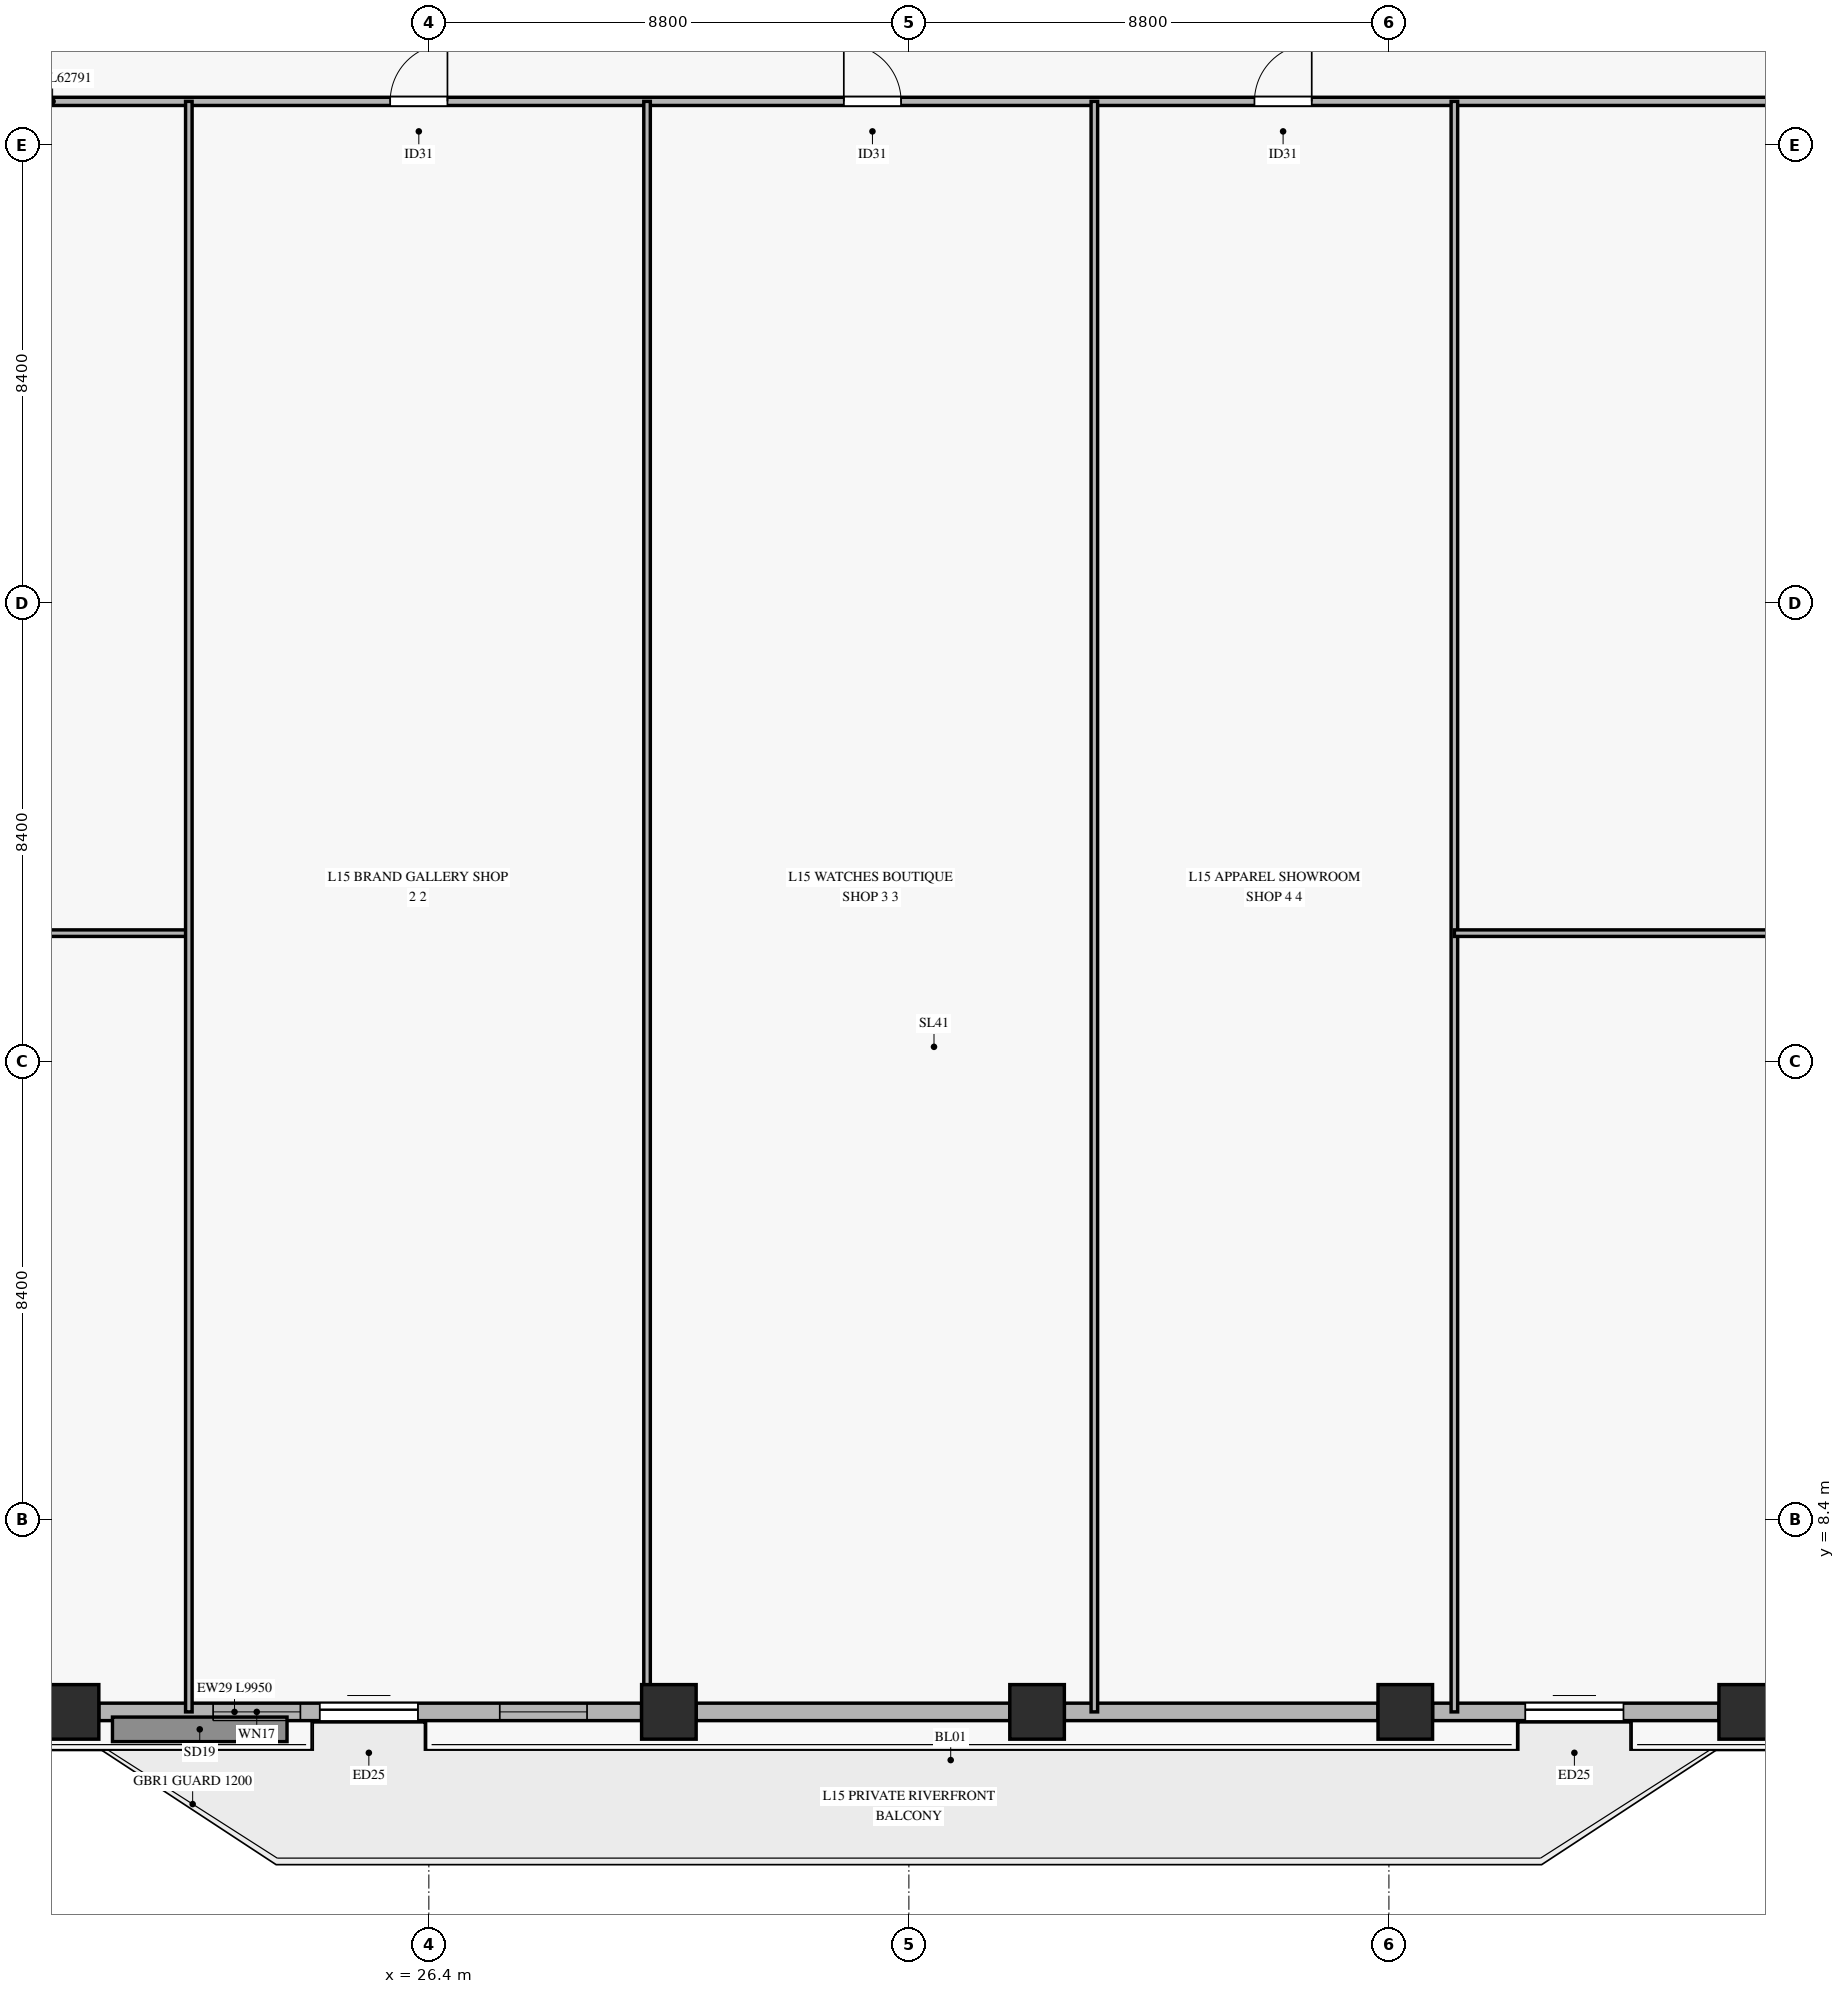
"""IFC4 building model, lengths in metres.
Left out: names, types, materials, properties, quantities, classifications, styles, units other than length and angle.
Written with IfcOpenShell. Run it as: python <this file> out.ifc"""

import sys

from ifc_helpers import new_model, si_unit, direction, frame, frame_2d, origin, origin_2d, place, context, subcontext, project, spatial, rectangle, hollow_rectangle, extrude, source, transform, mapped, element, fill, save


model = new_model("IFC4")
c1 = context("Model", 3, precision=1e-05, world=origin(), true_north=direction((0.0, 1.0)))
c2 = subcontext(c1, "Body", "Model", "MODEL_VIEW")
j1 = project(units=[si_unit("LENGTHUNIT", "METRE"), si_unit("PLANEANGLEUNIT", "RADIAN")], contexts=[c1])
p1 = place(None, origin())
s1 = spatial("IfcSite", under=j1, at=p1, CompositionType="ELEMENT")
p2 = place(p1, origin())
s2 = spatial("IfcBuilding", under=s1, at=p2, CompositionType="ELEMENT")
p3 = place(p2, frame((0.0, 0.0, 61.1)))
s3 = spatial("IfcBuildingStorey", under=s2, at=p3, CompositionType="ELEMENT", Elevation=61.1)
m1 = source(origin(), c2, "Body", "SweptSolid", [
    extrude(hollow_rectangle(XDim=1.0, YDim=1.0, WallThickness=0.045, at=origin_2d()), origin(), (0.0, 0.0, 1.0), 3.68),
])
for number, where, z_axis, x_axis in (
    (1, (19.85, 4.882, 0.0), (0.0, 0.0, 1.0), (1.0, 0.0, 0.0)),
    (2, (30.8, 4.882, 0.0), (0.0, 0.0, 1.0), (1.0, 0.0, 0.0)),
    (3, (37.55, 4.882, 0.0), (0.0, 0.0, 1.0), (1.0, 0.0, 0.0)),
    (4, (44.3, 4.882, 0.0), (0.0, 0.0, 1.0), (1.0, 0.0, 0.0)),
    (5, (50.55, 4.882, 0.0), (0.0, 0.0, 1.0), (1.0, 0.0, 0.0)),
):
    element("IfcColumn", number, at=place(p3, frame(where, z_axis=z_axis, x_axis=x_axis)), inside=s3, PredefinedType="COLUMN", context=c2, shape_type="MappedRepresentation", body=[
        mapped(m1, transform((0.0, 0.0, 0.0), x_axis=(1.0, 0.0, 0.0), y_axis=(0.0, 1.0, 0.0), z_axis=(0.0, 0.0, 1.0), scale=1.0)),
    ])
p4 = place(p3, frame((20.35, 4.882, 0.0), z_axis=(0.0, 0.0, 1.0), x_axis=(1.0, 0.0, 0.0)))
e6 = element("IfcWall", 6, at=p4, inside=s3, PredefinedType="SOLIDWALL", context=c2, shape_type="SweptSolid", body=[
    extrude(rectangle(XDim=9.95, YDim=0.32, at=frame_2d((4.975, 0.0))), origin(), (0.0, 0.0, 1.0), 3.16),
])
p5 = place(p4, frame((4.05, 0.0, 0.0)))
e7 = element("IfcOpeningElement", 7, at=p5, cuts=e6, PredefinedType="OPENING", context=c2, shape_type="SweptSolid", body=[
    extrude(rectangle(XDim=1.8, YDim=2.25, at=frame_2d((0.9, 1.125))), frame((0.0, 0.17, 0.0), z_axis=(0.0, -1.0, 0.0), x_axis=(1.0, 0.0, 0.0)), (0.0, 0.0, 1.0), 0.34),
])
p6 = place(p4, frame((2.095, 0.0, 0.45)))
e8 = element("IfcOpeningElement", 8, at=p6, cuts=e6, PredefinedType="OPENING", context=c2, shape_type="SweptSolid", body=[
    extrude(rectangle(XDim=1.6, YDim=2.0, at=frame_2d((0.8, 1.0))), frame((0.0, 0.17, 0.0), z_axis=(0.0, -1.0, 0.0), x_axis=(1.0, 0.0, 0.0)), (0.0, 0.0, 1.0), 0.34),
])
p7 = place(p4, frame((7.35, 0.0, 0.45)))
e9 = element("IfcOpeningElement", 9, at=p7, cuts=e6, PredefinedType="OPENING", context=c2, shape_type="SweptSolid", body=[
    extrude(rectangle(XDim=1.6, YDim=2.0, at=frame_2d((0.8, 1.0))), frame((0.0, 0.17, 0.0), z_axis=(0.0, -1.0, 0.0), x_axis=(1.0, 0.0, 0.0)), (0.0, 0.0, 1.0), 0.34),
])
for number, where, z_axis, x_axis in (
    (10, (31.3, 4.882, 0.0), (0.0, 0.0, 1.0), (1.0, 0.0, 0.0)),
    (11, (38.05, 4.882, 0.0), (0.0, 0.0, 1.0), (1.0, 0.0, 0.0)),
):
    element("IfcWall", number, at=place(p3, frame(where, z_axis=z_axis, x_axis=x_axis)), inside=s3, PredefinedType="SOLIDWALL", context=c2, shape_type="SweptSolid", body=[
        extrude(rectangle(XDim=5.75, YDim=0.32, at=frame_2d((2.875, 0.0))), origin(), (0.0, 0.0, 1.0), 3.16),
    ])
p8 = place(p3, frame((44.8, 4.882, 0.0), z_axis=(0.0, 0.0, 1.0), x_axis=(1.0, 0.0, 0.0)))
e12 = element("IfcWall", 12, at=p8, inside=s3, PredefinedType="SOLIDWALL", context=c2, shape_type="SweptSolid", body=[
    extrude(rectangle(XDim=5.25, YDim=0.32, at=frame_2d((2.625, 0.0))), origin(), (0.0, 0.0, 1.0), 3.16),
])
p9 = place(p8, frame((1.7, 0.0, 0.0)))
e13 = element("IfcOpeningElement", 13, at=p9, cuts=e12, PredefinedType="OPENING", context=c2, shape_type="SweptSolid", body=[
    extrude(rectangle(XDim=1.8, YDim=2.25, at=frame_2d((0.9, 1.125))), frame((0.0, 0.17, 0.0), z_axis=(0.0, -1.0, 0.0), x_axis=(1.0, 0.0, 0.0)), (0.0, 0.0, 1.0), 0.34),
])
p10 = place(p3, frame((3.805, 34.4, 0.0), z_axis=(0.0, 0.0, 1.0), x_axis=(1.0, 0.0, 0.0)))
e14 = element("IfcWall", 14, at=p10, inside=s3, PredefinedType="PARTITIONING", context=c2, shape_type="SweptSolid", body=[
    extrude(rectangle(XDim=62.791, YDim=0.15, at=frame_2d((31.396, 0.0))), origin(), (0.0, 0.0, 1.0), 2.765),
])
p11 = place(p10, frame((7.564, 0.0, 0.0)))
e15 = element("IfcOpeningElement", 15, at=p11, cuts=e14, PredefinedType="OPENING", context=c2, shape_type="SweptSolid", body=[
    extrude(rectangle(XDim=1.05, YDim=2.15, at=frame_2d((0.525, 1.075))), frame((0.0, 0.085, 0.0), z_axis=(0.0, -1.0, 0.0), x_axis=(1.0, 0.0, 0.0)), (0.0, 0.0, 1.0), 0.17),
])
p12 = place(p10, frame((21.886, 0.0, 0.0)))
e16 = element("IfcOpeningElement", 16, at=p12, cuts=e14, PredefinedType="OPENING", context=c2, shape_type="SweptSolid", body=[
    extrude(rectangle(XDim=1.05, YDim=2.15, at=frame_2d((0.525, 1.075))), frame((0.0, 0.085, 0.0), z_axis=(0.0, -1.0, 0.0), x_axis=(1.0, 0.0, 0.0)), (0.0, 0.0, 1.0), 0.17),
])
p13 = place(p10, frame((30.202, 0.0, 0.0)))
e17 = element("IfcOpeningElement", 17, at=p13, cuts=e14, PredefinedType="OPENING", context=c2, shape_type="SweptSolid", body=[
    extrude(rectangle(XDim=1.05, YDim=2.15, at=frame_2d((0.525, 1.075))), frame((0.0, 0.085, 0.0), z_axis=(0.0, -1.0, 0.0), x_axis=(1.0, 0.0, 0.0)), (0.0, 0.0, 1.0), 0.17),
])
p14 = place(p10, frame((37.73, 0.0, 0.0)))
e18 = element("IfcOpeningElement", 18, at=p14, cuts=e14, PredefinedType="OPENING", context=c2, shape_type="SweptSolid", body=[
    extrude(rectangle(XDim=1.05, YDim=2.15, at=frame_2d((0.525, 1.075))), frame((0.0, 0.085, 0.0), z_axis=(0.0, -1.0, 0.0), x_axis=(1.0, 0.0, 0.0)), (0.0, 0.0, 1.0), 0.17),
])
p15 = place(p10, frame((50.039, 0.0, 0.0)))
e19 = element("IfcOpeningElement", 19, at=p15, cuts=e14, PredefinedType="OPENING", context=c2, shape_type="SweptSolid", body=[
    extrude(rectangle(XDim=1.05, YDim=2.15, at=frame_2d((0.525, 1.075))), frame((0.0, 0.085, 0.0), z_axis=(0.0, -1.0, 0.0), x_axis=(1.0, 0.0, 0.0)), (0.0, 0.0, 1.0), 0.17),
])
p16 = place(p3, frame((3.805, 19.155, 0.0), z_axis=(0.0, 0.0, 1.0), x_axis=(1.0, 0.0, 0.0)))
e20 = element("IfcWall", 20, at=p16, inside=s3, PredefinedType="PARTITIONING", context=c2, shape_type="SweptSolid", body=[
    extrude(rectangle(XDim=18.195, YDim=0.12, at=frame_2d((9.098, 0.0))), origin(), (0.0, 0.0, 1.0), 2.765),
])
p17 = place(p16, frame((7.921, 0.0, 0.0)))
e21 = element("IfcOpeningElement", 21, at=p17, cuts=e20, PredefinedType="OPENING", context=c2, shape_type="SweptSolid", body=[
    extrude(rectangle(XDim=0.95, YDim=2.1, at=frame_2d((0.475, 1.05))), frame((0.0, 0.07, 0.0), z_axis=(0.0, -1.0, 0.0), x_axis=(1.0, 0.0, 0.0)), (0.0, 0.0, 1.0), 0.14),
])
p18 = place(p3, frame((22.0, 4.882, 0.0), z_axis=(0.0, 0.0, 1.0), x_axis=(0.0, 1.0, 0.0)))
e22 = element("IfcWall", 22, at=p18, inside=s3, PredefinedType="PARTITIONING", context=c2, shape_type="SweptSolid", body=[
    extrude(rectangle(XDim=29.518, YDim=0.12, at=frame_2d((14.759, 0.0))), origin(), (0.0, 0.0, 1.0), 3.165),
])
p19 = place(p3, frame((30.4, 4.882, 0.0), z_axis=(0.0, 0.0, 1.0), x_axis=(0.0, 1.0, 0.0)))
e23 = element("IfcWall", 23, at=p19, inside=s3, PredefinedType="PARTITIONING", context=c2, shape_type="SweptSolid", body=[
    extrude(rectangle(XDim=29.518, YDim=0.12, at=frame_2d((14.759, 0.0))), origin(), (0.0, 0.0, 1.0), 3.215),
])
for number, where, z_axis, x_axis in (
    (24, (38.6, 4.882, 0.0), (0.0, 0.0, 1.0), (0.0, 1.0, 0.0)),
    (25, (45.2, 4.882, 0.0), (0.0, 0.0, 1.0), (0.0, 1.0, 0.0)),
):
    element("IfcWall", number, at=place(p3, frame(where, z_axis=z_axis, x_axis=x_axis)), inside=s3, PredefinedType="PARTITIONING", context=c2, shape_type="SweptSolid", body=[
        extrude(rectangle(XDim=29.518, YDim=0.12, at=frame_2d((14.759, 0.0))), origin(), (0.0, 0.0, 1.0), 3.165),
    ])
p20 = place(p3, frame((45.2, 19.155, 0.0), z_axis=(0.0, 0.0, 1.0), x_axis=(1.0, 0.0, 0.0)))
e26 = element("IfcWall", 26, at=p20, inside=s3, PredefinedType="PARTITIONING", context=c2, shape_type="SweptSolid", body=[
    extrude(rectangle(XDim=21.396, YDim=0.12, at=frame_2d((10.698, 0.0))), origin(), (0.0, 0.0, 1.0), 2.765),
])
p21 = place(p20, frame((9.065, 0.0, 0.0)))
e27 = element("IfcOpeningElement", 27, at=p21, cuts=e26, PredefinedType="OPENING", context=c2, shape_type="SweptSolid", body=[
    extrude(rectangle(XDim=0.95, YDim=2.1, at=frame_2d((0.475, 1.05))), frame((0.0, 0.07, 0.0), z_axis=(0.0, -1.0, 0.0), x_axis=(1.0, 0.0, 0.0)), (0.0, 0.0, 1.0), 0.14),
])
m2 = source(origin(), c2, "Body", "SweptSolid", [
    extrude(rectangle(XDim=1.8, YDim=2.25, at=frame_2d((0.9, 1.125))), frame((0.0, 0.025, 0.0), z_axis=(0.0, -1.0, 0.0), x_axis=(1.0, 0.0, 0.0)), (0.0, 0.0, 1.0), 0.05),
])
p22 = place(p5, origin())
e28 = element("IfcDoor", 28, at=p22, inside=s3, OperationType="SLIDING_TO_LEFT", PredefinedType="DOOR", context=c2, shape_type="MappedRepresentation", body=[
    mapped(m2, transform((0.0, 0.0, 0.0), x_axis=(1.0, 0.0, 0.0), y_axis=(0.0, 1.0, 0.0), z_axis=(0.0, 0.0, 1.0), scale=1.0)),
])
fill(e7, e28)
m3 = source(origin(), c2, "Body", "SweptSolid", [
    extrude(rectangle(XDim=1.6, YDim=2.0, at=frame_2d((0.8, 1.0))), frame((0.0, 0.03, 0.0), z_axis=(0.0, -1.0, 0.0), x_axis=(1.0, 0.0, 0.0)), (0.0, 0.0, 1.0), 0.06),
])
p23 = place(p6, origin())
e29 = element("IfcWindow", 29, at=p23, inside=s3, PartitioningType="SINGLE_PANEL", PredefinedType="WINDOW", context=c2, shape_type="MappedRepresentation", body=[
    mapped(m3, transform((0.0, 0.0, 0.0), x_axis=(1.0, 0.0, 0.0), y_axis=(0.0, 1.0, 0.0), z_axis=(0.0, 0.0, 1.0), scale=1.0)),
])
fill(e8, e29)
p24 = place(p7, origin())
e30 = element("IfcWindow", 30, at=p24, inside=s3, PartitioningType="SINGLE_PANEL", PredefinedType="WINDOW", context=c2, shape_type="MappedRepresentation", body=[
    mapped(m3, transform((0.0, 0.0, 0.0), x_axis=(1.0, 0.0, 0.0), y_axis=(0.0, 1.0, 0.0), z_axis=(0.0, 0.0, 1.0), scale=1.0)),
])
fill(e9, e30)
p25 = place(p9, origin())
e31 = element("IfcDoor", 31, at=p25, inside=s3, OperationType="SLIDING_TO_LEFT", PredefinedType="DOOR", context=c2, shape_type="MappedRepresentation", body=[
    mapped(m2, transform((0.0, 0.0, 0.0), x_axis=(1.0, 0.0, 0.0), y_axis=(0.0, 1.0, 0.0), z_axis=(0.0, 0.0, 1.0), scale=1.0)),
])
fill(e13, e31)
m4 = source(origin(), c2, "Body", "SweptSolid", [
    extrude(rectangle(XDim=1.05, YDim=2.15, at=frame_2d((0.525, 1.075))), frame((0.0, 0.025, 0.0), z_axis=(0.0, -1.0, 0.0), x_axis=(1.0, 0.0, 0.0)), (0.0, 0.0, 1.0), 0.05),
])
p26 = place(p12, origin())
e32 = element("IfcDoor", 32, at=p26, inside=s3, OperationType="SINGLE_SWING_RIGHT", PredefinedType="DOOR", context=c2, shape_type="MappedRepresentation", body=[
    mapped(m4, transform((0.0, 0.0, 0.0), x_axis=(1.0, 0.0, 0.0), y_axis=(0.0, 1.0, 0.0), z_axis=(0.0, 0.0, 1.0), scale=1.0)),
])
fill(e16, e32)
p27 = place(p13, origin())
e33 = element("IfcDoor", 33, at=p27, inside=s3, OperationType="SINGLE_SWING_LEFT", PredefinedType="DOOR", context=c2, shape_type="MappedRepresentation", body=[
    mapped(m4, transform((0.0, 0.0, 0.0), x_axis=(1.0, 0.0, 0.0), y_axis=(0.0, 1.0, 0.0), z_axis=(0.0, 0.0, 1.0), scale=1.0)),
])
fill(e17, e33)
p28 = place(p14, origin())
e34 = element("IfcDoor", 34, at=p28, inside=s3, OperationType="SINGLE_SWING_RIGHT", PredefinedType="DOOR", context=c2, shape_type="MappedRepresentation", body=[
    mapped(m4, transform((0.0, 0.0, 0.0), x_axis=(1.0, 0.0, 0.0), y_axis=(0.0, 1.0, 0.0), z_axis=(0.0, 0.0, 1.0), scale=1.0)),
])
fill(e18, e34)
save(model, sys.argv[1])
